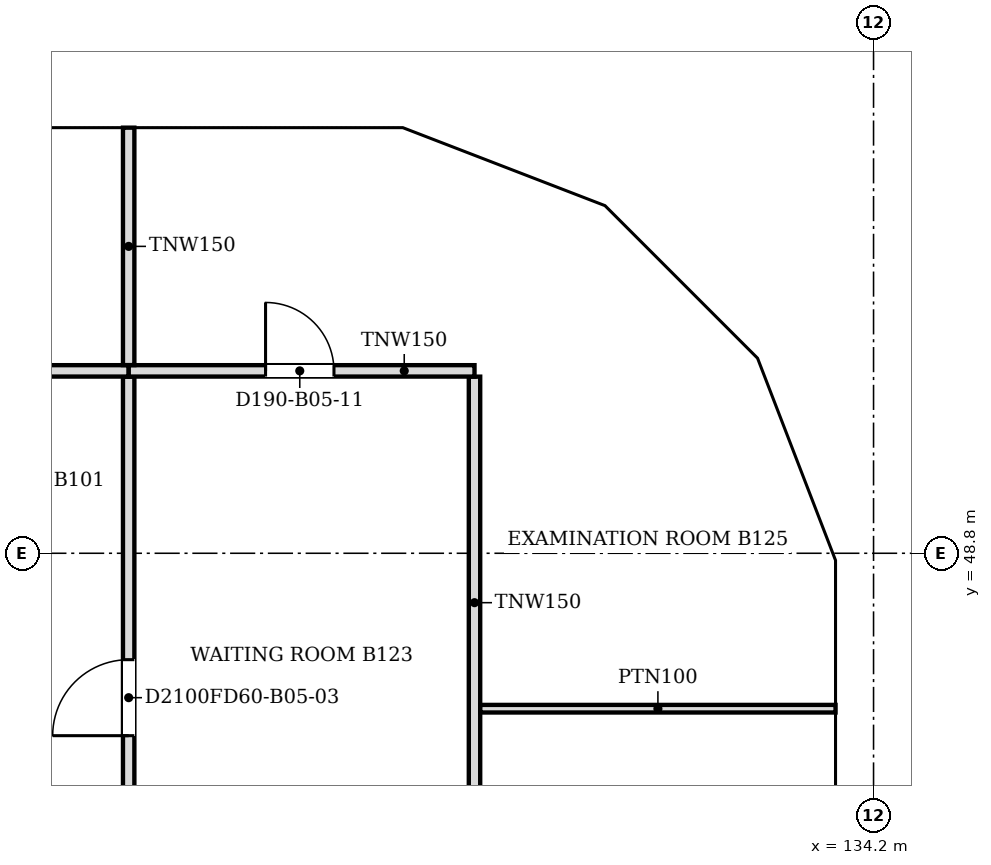
"""IFC4 building model, lengths in metres.
Left out: names, types, materials, properties, quantities, classifications, styles, units other than length and angle.
Written with IfcOpenShell. Run it as: python <this file> out.ifc"""

import sys

from ifc_helpers import new_model, si_unit, direction, frame, frame_2d, origin, place, context, subcontext, project, spatial, polyline, rectangle, outline, extrude, faceted_brep, source, transform, mapped, element, fill, save


model = new_model("IFC4")
c1 = context("Model", 3, precision=1e-05, world=origin(), true_north=direction((0.0, 1.0)))
c2 = subcontext(c1, "Body", "Model", "MODEL_VIEW")
j1 = project(units=[si_unit("LENGTHUNIT", "METRE"), si_unit("PLANEANGLEUNIT", "RADIAN")], contexts=[c1])
p1 = place(None, origin())
s1 = spatial("IfcSite", under=j1, at=p1, CompositionType="ELEMENT")
p2 = place(p1, origin())
s2 = spatial("IfcBuilding", under=s1, at=p2, CompositionType="ELEMENT")
p3 = place(p2, frame((0.0, 0.0, 48.6)))
s3 = spatial("IfcBuildingStorey", under=s2, at=p3, CompositionType="ELEMENT", Elevation=48.6)
m1 = source(origin(), c2, "Body", "Brep", [
    faceted_brep([(3.05, -0.25, 0.0), (6.053, -0.25, 3.8), (3.05, -0.25, 7.6), (0.0, -0.25, 3.8), (0.0, 0.25, 3.8), (3.05, 0.25, 7.6), (6.007, 0.25, 3.859), (6.007, 0.25, 3.741), (3.05, 0.25, 0.0), (6.053, 0.0, 3.8)], [[[0, 1, 2, 3]], [[4, 5, 6, 7, 8]], [[8, 7, 9, 1, 0]], [[6, 5, 2, 1, 9]], [[5, 4, 3, 2]], [[4, 8, 0, 3]], [[7, 6, 9]]]),
])
p4 = place(p3, frame((133.95, 42.7, -3.8), z_axis=(0.0, 0.0, 1.0), x_axis=(0.0, 1.0, 0.0)))
e1 = element("IfcWall", 1, at=p4, inside=s3, PredefinedType="SOLIDWALL", context=c2, shape_type="MappedRepresentation", body=[
    mapped(m1, transform((0.0, 0.0, 0.0), scale=1.0)),
])
m2 = source(origin(), c2, "Body", "SweptSolid", [
    extrude(outline(polyline([(3.049, 0.401), (5.735, 3.8), (3.049, 7.199), (0.321, 3.8), (3.049, 0.401)])), frame((0.0, 0.26, 0.0), z_axis=(0.0, -1.0, 0.0), x_axis=(1.0, 0.0, 0.0)), (0.0, 0.0, 1.0), 0.52),
])
p5 = place(p4, origin())
e2 = element("IfcOpeningElement", 2, at=p5, cuts=e1, PredefinedType="OPENING", context=c2, shape_type="MappedRepresentation", body=[
    mapped(m2, transform((0.0, 0.0, 0.0), scale=1.0)),
])
m3 = source(origin(), c2, "Body", "Brep", [
    faceted_brep([(2.95, -0.25, 0.0), (3.003, -0.25, 0.068), (3.003, -0.25, 7.531), (2.95, -0.25, 7.6), (0.0, -0.25, 3.8), (0.047, 0.25, 3.86), (2.898, 0.25, 7.532), (2.898, 0.25, 0.068), (0.047, 0.25, 3.74), (2.95, 0.0, 0.0), (2.95, 0.0, 7.6), (0.0, 0.0, 3.8)], [[[0, 1, 2, 3, 4]], [[5, 6, 7, 8]], [[1, 0, 9]], [[10, 3, 2]], [[6, 5, 11, 4, 3, 10]], [[8, 7, 9, 0, 4, 11]], [[8, 11, 5]], [[1, 9, 7, 6, 10, 2]]]),
])
p6 = place(p3, frame((133.95, 48.753, -3.8), z_axis=(0.0, 0.0, 1.0), x_axis=(-0.359855894603, 0.933007896601, 0.0)))
e3 = element("IfcWall", 3, at=p6, inside=s3, PredefinedType="SOLIDWALL", context=c2, shape_type="MappedRepresentation", body=[
    mapped(m3, transform((0.0, 0.0, 0.0), scale=1.0)),
])
m4 = source(origin(), c2, "Body", "SweptSolid", [
    extrude(outline(polyline([(2.75, 6.935), (0.316, 3.8), (2.75, 0.665), (2.75, 6.935)])), frame((0.0, 0.26, 0.0), z_axis=(0.0, -1.0, 0.0), x_axis=(1.0, 0.0, 0.0)), (0.0, 0.0, 1.0), 0.52),
])
p7 = place(p6, origin())
e4 = element("IfcOpeningElement", 4, at=p7, cuts=e3, PredefinedType="OPENING", context=c2, shape_type="MappedRepresentation", body=[
    mapped(m4, transform((0.0, 0.0, 0.0), scale=1.0)),
])
m5 = source(origin(), c2, "Body", "Brep", [
    faceted_brep([(0.053, -0.25, 0.0), (2.997, -0.25, 3.8), (0.053, -0.25, 7.6), (0.0, -0.25, 7.532), (0.0, -0.25, 0.068), (0.106, 0.25, 7.531), (2.944, 0.25, 3.868), (2.944, 0.25, 3.732), (0.106, 0.25, 0.068), (2.997, 0.0, 3.8), (0.053, 0.0, 0.0), (0.053, 0.0, 7.6)], [[[0, 1, 2, 3, 4]], [[5, 6, 7, 8]], [[8, 7, 9, 1, 0, 10]], [[6, 5, 11, 2, 1, 9]], [[3, 2, 11]], [[10, 0, 4]], [[8, 10, 4, 3, 11, 5]], [[7, 6, 9]]]),
])
p8 = place(p3, frame((132.926, 51.469, -3.8), z_axis=(0.0, 0.0, 1.0), x_axis=(-0.707066050402, 0.707147509625, 0.0)))
e5 = element("IfcWall", 5, at=p8, inside=s3, PredefinedType="SOLIDWALL", context=c2, shape_type="MappedRepresentation", body=[
    mapped(m5, transform((0.0, 0.0, 0.0), scale=1.0)),
])
m6 = source(origin(), c2, "Body", "SweptSolid", [
    extrude(outline(polyline([(0.253, 0.666), (2.681, 3.8), (0.253, 6.934), (0.253, 0.666)])), frame((0.0, 0.26, 0.0), z_axis=(0.0, -1.0, 0.0), x_axis=(1.0, 0.0, 0.0)), (0.0, 0.0, 1.0), 0.52),
])
p9 = place(p8, origin())
e6 = element("IfcOpeningElement", 6, at=p9, cuts=e5, PredefinedType="OPENING", context=c2, shape_type="MappedRepresentation", body=[
    mapped(m6, transform((0.0, 0.0, 0.0), scale=1.0)),
])
m7 = source(origin(), c2, "Body", "Brep", [
    faceted_brep([(2.95, -0.25, 0.0), (2.997, -0.25, 0.059), (2.997, -0.25, 7.541), (2.95, -0.25, 7.6), (0.0, -0.25, 3.8), (0.053, 0.25, 3.868), (2.904, 0.25, 7.54), (2.904, 0.25, 0.06), (0.053, 0.25, 3.732), (2.95, 0.0, 0.0), (2.95, 0.0, 7.6), (0.0, 0.0, 3.8)], [[[0, 1, 2, 3, 4]], [[5, 6, 7, 8]], [[1, 0, 9]], [[10, 3, 2]], [[6, 5, 11, 4, 3, 10]], [[8, 7, 9, 0, 4, 11]], [[8, 11, 5]], [[1, 9, 7, 6, 10, 2]]]),
])
p10 = place(p3, frame((130.806, 53.588, -3.8), z_axis=(0.0, 0.0, 1.0), x_axis=(-0.932990326376, 0.359901446078, 0.0)))
e7 = element("IfcWall", 7, at=p10, inside=s3, PredefinedType="SOLIDWALL", context=c2, shape_type="MappedRepresentation", body=[
    mapped(m7, transform((0.0, 0.0, 0.0), scale=1.0)),
])
p11 = place(p10, origin())
e8 = element("IfcOpeningElement", 8, at=p11, cuts=e7, PredefinedType="OPENING", context=c2, shape_type="MappedRepresentation", body=[
    mapped(m4, transform((0.0, 0.0, 0.0), scale=1.0)),
])
m8 = source(origin(), c2, "Body", "Brep", [
    faceted_brep([(0.047, -0.25, 0.0), (3.05, -0.25, 3.8), (0.047, -0.25, 7.6), (0.0, -0.25, 7.54), (0.0, -0.25, 0.06), (0.093, 0.25, 7.541), (3.05, 0.25, 3.8), (0.093, 0.25, 0.059), (0.047, 0.0, 0.0), (0.047, 0.0, 7.6)], [[[0, 1, 2, 3, 4]], [[5, 6, 7]], [[7, 6, 1, 0, 8]], [[6, 5, 9, 2, 1]], [[3, 2, 9]], [[8, 0, 4]], [[7, 8, 4, 3, 9, 5]]]),
])
p12 = place(p3, frame((128.1, 54.65, -3.8), z_axis=(0.0, 0.0, 1.0), x_axis=(-1.0, 0.0, 0.0)))
e9 = element("IfcWall", 9, at=p12, inside=s3, PredefinedType="SOLIDWALL", context=c2, shape_type="MappedRepresentation", body=[
    mapped(m8, transform((0.0, 0.0, 0.0), scale=1.0)),
])
m9 = source(origin(), c2, "Body", "SweptSolid", [
    extrude(outline(polyline([(0.247, 0.656), (2.731, 3.8), (0.247, 6.944), (0.247, 0.656)])), frame((0.0, 0.26, 0.0), z_axis=(0.0, -1.0, 0.0), x_axis=(1.0, 0.0, 0.0)), (0.0, 0.0, 1.0), 0.52),
])
p13 = place(p12, origin())
e10 = element("IfcOpeningElement", 10, at=p13, cuts=e9, PredefinedType="OPENING", context=c2, shape_type="MappedRepresentation", body=[
    mapped(m9, transform((0.0, 0.0, 0.0), scale=1.0)),
])
m10 = source(origin(), c2, "Body", "SweptSolid", [
    extrude(outline(polyline([(3.05, 0.0), (6.1, 3.8), (3.05, 7.6), (0.0, 3.8), (3.05, 0.0)])), frame((0.0, 0.25, 0.0), z_axis=(0.0, -1.0, 0.0), x_axis=(1.0, 0.0, 0.0)), (0.0, 0.0, 1.0), 0.5),
])
p14 = place(p3, frame((125.05, 54.65, -3.8), z_axis=(0.0, 0.0, 1.0), x_axis=(-1.0, 0.0, 0.0)))
e11 = element("IfcWall", 11, at=p14, inside=s3, PredefinedType="SOLIDWALL", context=c2, shape_type="MappedRepresentation", body=[
    mapped(m10, transform((0.0, 0.0, 0.0), scale=1.0)),
])
m11 = source(origin(), c2, "Body", "SweptSolid", [
    extrude(outline(polyline([(3.05, 0.399), (5.78, 3.8), (3.05, 7.2), (0.321, 3.8), (3.05, 0.399)])), frame((0.0, 0.26, 0.0), z_axis=(0.0, -1.0, 0.0), x_axis=(1.0, 0.0, 0.0)), (0.0, 0.0, 1.0), 0.52),
])
p15 = place(p14, origin())
e12 = element("IfcOpeningElement", 12, at=p15, cuts=e11, PredefinedType="OPENING", context=c2, shape_type="MappedRepresentation", body=[
    mapped(m11, transform((0.0, 0.0, 0.0), scale=1.0)),
])
p16 = place(p2, frame((0.0, 0.0, 52.4)))
s4 = spatial("IfcBuildingStorey", under=s2, at=p16, CompositionType="ELEMENT", Elevation=52.4)
m12 = source(origin(), c2, "Body", "Brep", [
    faceted_brep([(3.003, -0.25, 0.0), (3.05, -0.25, 0.06), (3.05, -0.25, 7.54), (3.003, -0.25, 7.6), (0.0, -0.25, 3.8), (0.0, 0.25, 3.8), (2.957, 0.25, 7.541), (2.957, 0.25, 0.059), (3.003, 0.0, 0.0), (3.003, 0.0, 7.6)], [[[0, 1, 2, 3, 4]], [[5, 6, 7]], [[1, 0, 8]], [[9, 3, 2]], [[6, 5, 4, 3, 9]], [[5, 7, 8, 0, 4]], [[1, 8, 7, 6, 9, 2]]]),
])
p17 = place(p16, frame((133.95, 45.75, -3.8), z_axis=(0.0, 0.0, 1.0), x_axis=(0.0, 1.0, 0.0)))
e13 = element("IfcWall", 13, at=p17, inside=s4, PredefinedType="SOLIDWALL", context=c2, shape_type="MappedRepresentation", body=[
    mapped(m12, transform((0.0, 0.0, 0.0), scale=1.0)),
])
m13 = source(origin(), c2, "Body", "SweptSolid", [
    extrude(outline(polyline([(2.803, 6.944), (0.319, 3.8), (2.803, 0.656), (2.803, 6.944)])), frame((0.0, 0.26, 0.0), z_axis=(0.0, -1.0, 0.0), x_axis=(1.0, 0.0, 0.0)), (0.0, 0.0, 1.0), 0.52),
])
p18 = place(p17, origin())
e14 = element("IfcOpeningElement", 14, at=p18, cuts=e13, PredefinedType="OPENING", context=c2, shape_type="MappedRepresentation", body=[
    mapped(m13, transform((0.0, 0.0, 0.0), scale=1.0)),
])
m14 = source(origin(), c2, "Body", "Brep", [
    faceted_brep([(0.047, -0.25, 0.0), (2.997, -0.25, 3.8), (0.047, -0.25, 7.6), (0.0, -0.25, 7.541), (0.0, -0.25, 0.059), (0.093, 0.25, 7.54), (2.944, 0.25, 3.868), (2.944, 0.25, 3.732), (0.093, 0.25, 0.06), (2.997, 0.0, 3.8), (0.047, 0.0, 0.0), (0.047, 0.0, 7.6)], [[[0, 1, 2, 3, 4]], [[5, 6, 7, 8]], [[8, 7, 9, 1, 0, 10]], [[6, 5, 11, 2, 1, 9]], [[3, 2, 11]], [[10, 0, 4]], [[8, 10, 4, 3, 11, 5]], [[9, 7, 6]]]),
])
p19 = place(p16, frame((133.967, 48.71, -3.8), z_axis=(0.0, 0.0, 1.0), x_axis=(-0.359901446078, 0.932990326376, 0.0)))
e15 = element("IfcWall", 15, at=p19, inside=s4, PredefinedType="SOLIDWALL", context=c2, shape_type="MappedRepresentation", body=[
    mapped(m14, transform((0.0, 0.0, 0.0), scale=1.0)),
])
m15 = source(origin(), c2, "Body", "SweptSolid", [
    extrude(outline(polyline([(0.247, 0.665), (2.681, 3.8), (0.247, 6.935), (0.247, 0.665)])), frame((0.0, 0.26, 0.0), z_axis=(0.0, -1.0, 0.0), x_axis=(1.0, 0.0, 0.0)), (0.0, 0.0, 1.0), 0.52),
])
p20 = place(p19, origin())
e16 = element("IfcOpeningElement", 16, at=p20, cuts=e15, PredefinedType="OPENING", context=c2, shape_type="MappedRepresentation", body=[
    mapped(m15, transform((0.0, 0.0, 0.0), scale=1.0)),
])
m16 = source(origin(), c2, "Body", "Brep", [
    faceted_brep([(2.944, -0.25, 0.0), (2.997, -0.25, 0.068), (2.997, -0.25, 7.532), (2.944, -0.25, 7.6), (0.0, -0.25, 3.8), (0.053, 0.25, 3.868), (2.891, 0.25, 7.532), (2.891, 0.25, 0.068), (0.053, 0.25, 3.731), (2.944, 0.0, 0.0), (2.944, 0.0, 7.6), (0.0, 0.0, 3.8)], [[[0, 1, 2, 3, 4]], [[5, 6, 7, 8]], [[1, 0, 9]], [[10, 3, 2]], [[6, 5, 11, 4, 3, 10]], [[8, 7, 9, 0, 4, 11]], [[8, 11, 5]], [[1, 9, 7, 6, 10, 2]]]),
])
p21 = place(p16, frame((132.888, 51.506, -3.8), z_axis=(0.0, 0.0, 1.0), x_axis=(-0.707147509625, 0.707066050402, 0.0)))
e17 = element("IfcWall", 17, at=p21, inside=s4, PredefinedType="SOLIDWALL", context=c2, shape_type="MappedRepresentation", body=[
    mapped(m16, transform((0.0, 0.0, 0.0), scale=1.0)),
])
m17 = source(origin(), c2, "Body", "SweptSolid", [
    extrude(outline(polyline([(2.744, 6.934), (0.316, 3.8), (2.744, 0.666), (2.744, 6.934)])), frame((0.0, 0.26, 0.0), z_axis=(0.0, -1.0, 0.0), x_axis=(1.0, 0.0, 0.0)), (0.0, 0.0, 1.0), 0.52),
])
p22 = place(p21, origin())
e18 = element("IfcOpeningElement", 18, at=p22, cuts=e17, PredefinedType="OPENING", context=c2, shape_type="MappedRepresentation", body=[
    mapped(m17, transform((0.0, 0.0, 0.0), scale=1.0)),
])
m18 = source(origin(), c2, "Body", "Brep", [
    faceted_brep([(0.053, -0.25, 0.0), (3.003, -0.25, 3.8), (0.053, -0.25, 7.6), (0.0, -0.25, 7.531), (0.0, -0.25, 0.068), (0.106, 0.25, 7.532), (2.957, 0.25, 3.86), (2.957, 0.25, 3.74), (0.106, 0.25, 0.068), (3.003, 0.0, 3.8), (0.053, 0.0, 0.0), (0.053, 0.0, 7.6)], [[[0, 1, 2, 3, 4]], [[5, 6, 7, 8]], [[8, 7, 9, 1, 0, 10]], [[6, 5, 11, 2, 1, 9]], [[3, 2, 11]], [[10, 0, 4]], [[8, 10, 4, 3, 11, 5]], [[9, 7, 6]]]),
])
p23 = place(p16, frame((130.856, 53.569, -3.8), z_axis=(0.0, 0.0, 1.0), x_axis=(-0.933007896601, 0.359855894603, 0.0)))
e19 = element("IfcWall", 19, at=p23, inside=s4, PredefinedType="SOLIDWALL", context=c2, shape_type="MappedRepresentation", body=[
    mapped(m18, transform((0.0, 0.0, 0.0), scale=1.0)),
])
m19 = source(origin(), c2, "Body", "SweptSolid", [
    extrude(outline(polyline([(0.253, 0.665), (2.687, 3.8), (0.253, 6.935), (0.253, 0.665)])), frame((0.0, 0.26, 0.0), z_axis=(0.0, -1.0, 0.0), x_axis=(1.0, 0.0, 0.0)), (0.0, 0.0, 1.0), 0.52),
])
p24 = place(p23, origin())
e20 = element("IfcOpeningElement", 20, at=p24, cuts=e19, PredefinedType="OPENING", context=c2, shape_type="MappedRepresentation", body=[
    mapped(m19, transform((0.0, 0.0, 0.0), scale=1.0)),
])
m20 = source(origin(), c2, "Body", "Brep", [
    faceted_brep([(3.003, -0.25, 0.0), (6.053, -0.25, 3.8), (3.003, -0.25, 7.6), (0.0, -0.25, 3.8), (0.047, 0.25, 3.859), (3.003, 0.25, 7.6), (6.053, 0.25, 3.8), (3.003, 0.25, 0.0), (0.047, 0.25, 3.741), (0.0, 0.0, 3.8)], [[[0, 1, 2, 3]], [[4, 5, 6, 7, 8]], [[7, 6, 1, 0]], [[6, 5, 2, 1]], [[5, 4, 9, 3, 2]], [[8, 7, 0, 3, 9]], [[8, 9, 4]]]),
])
p25 = place(p16, frame((128.053, 54.65, -3.8), z_axis=(0.0, 0.0, 1.0), x_axis=(-1.0, 0.0, 0.0)))
e21 = element("IfcWall", 21, at=p25, inside=s4, PredefinedType="SOLIDWALL", context=c2, shape_type="MappedRepresentation", body=[
    mapped(m20, transform((0.0, 0.0, 0.0), scale=1.0)),
])
m21 = source(origin(), c2, "Body", "SweptSolid", [
    extrude(outline(polyline([(3.005, 0.401), (5.733, 3.8), (3.005, 7.199), (0.319, 3.8), (3.005, 0.401)])), frame((0.0, 0.26, 0.0), z_axis=(0.0, -1.0, 0.0), x_axis=(1.0, 0.0, 0.0)), (0.0, 0.0, 1.0), 0.52),
])
p26 = place(p25, origin())
e22 = element("IfcOpeningElement", 22, at=p26, cuts=e21, PredefinedType="OPENING", context=c2, shape_type="MappedRepresentation", body=[
    mapped(m21, transform((0.0, 0.0, 0.0), scale=1.0)),
])
p27 = place(p3, frame((124.4, 51.124, 0.0), z_axis=(0.0, 0.0, 1.0), x_axis=(0.0, -1.0, 0.0)))
e23 = element("IfcWall", 23, at=p27, inside=s3, PredefinedType="PARTITIONING", context=c2, shape_type="SweptSolid", body=[
    extrude(rectangle(XDim=14.524, YDim=0.15, at=frame_2d((7.262, 0.0))), origin(), (0.0, 0.0, 1.0), 3.067),
])
m22 = source(origin(), c2, "Body", "SweptSolid", [
    extrude(rectangle(XDim=1.0, YDim=2.1, at=frame_2d((0.5, 1.05))), frame((0.0, 0.085, 0.0), z_axis=(0.0, -1.0, 0.0), x_axis=(1.0, 0.0, 0.0)), (0.0, 0.0, 1.0), 0.17),
])
p28 = place(p27, frame((3.724, 0.0, 0.0)))
e24 = element("IfcOpeningElement", 24, at=p28, cuts=e23, PredefinedType="OPENING", context=c2, shape_type="MappedRepresentation", body=[
    mapped(m22, transform((0.0, 0.0, 0.0), scale=1.0)),
])
p29 = place(p3, frame((128.95, 51.124, 0.0), z_axis=(0.0, 0.0, 1.0), x_axis=(0.0, -1.0, 0.0)))
e25 = element("IfcWall", 25, at=p29, inside=s3, PredefinedType="PARTITIONING", context=c2, shape_type="SweptSolid", body=[
    extrude(rectangle(XDim=8.448, YDim=0.15, at=frame_2d((4.224, 0.0))), origin(), (0.0, 0.0, 1.0), 3.067),
])
m23 = source(origin(), c2, "Body", "SweptSolid", [
    extrude(rectangle(XDim=0.9, YDim=2.1, at=frame_2d((0.45, 1.05))), frame((0.0, 0.085, 0.0), z_axis=(0.0, -1.0, 0.0), x_axis=(1.0, 0.0, 0.0)), (0.0, 0.0, 1.0), 0.17),
])
p30 = place(p29, frame((5.948, 0.0, 0.0)))
e26 = element("IfcOpeningElement", 26, at=p30, cuts=e25, PredefinedType="OPENING", context=c2, shape_type="MappedRepresentation", body=[
    mapped(m23, transform((0.0, 0.0, 0.0), scale=1.0)),
])
p31 = place(p3, frame((129.026, 46.755, 0.0), z_axis=(0.0, 0.0, 1.0), x_axis=(1.0, 0.0, 0.0)))
e27 = element("IfcWall", 27, at=p31, inside=s3, PredefinedType="PARTITIONING", context=c2, shape_type="SweptSolid", body=[
    extrude(rectangle(XDim=4.674, YDim=0.1, at=frame_2d((2.337, 0.0))), origin(), (0.0, 0.0, 1.0), 3.067),
])
p32 = place(p3, frame((108.5, 51.2, 0.0), z_axis=(0.0, 0.0, 1.0), x_axis=(1.0, 0.0, 0.0)))
e28 = element("IfcWall", 28, at=p32, inside=s3, PredefinedType="PARTITIONING", context=c2, shape_type="SweptSolid", body=[
    extrude(rectangle(XDim=15.9, YDim=0.15, at=frame_2d((7.95, 0.0))), origin(), (0.0, 0.0, 1.0), 3.067),
])
p33 = place(p32, frame((7.4, 0.0, 0.0)))
e29 = element("IfcOpeningElement", 29, at=p33, cuts=e28, PredefinedType="OPENING", context=c2, shape_type="MappedRepresentation", body=[
    mapped(m22, transform((0.0, 0.0, 0.0), scale=1.0)),
])
p34 = place(p3, frame((124.401, 51.2, 0.0), z_axis=(0.0, 0.0, 1.0), x_axis=(1.0, 0.0, 0.0)))
e30 = element("IfcWall", 30, at=p34, inside=s3, PredefinedType="PARTITIONING", context=c2, shape_type="SweptSolid", body=[
    extrude(rectangle(XDim=4.549, YDim=0.15, at=frame_2d((2.274, 0.0))), origin(), (0.0, 0.0, 1.0), 3.067),
])
p35 = place(p34, frame((1.8, 0.0, 0.0)))
e31 = element("IfcOpeningElement", 31, at=p35, cuts=e30, PredefinedType="OPENING", context=c2, shape_type="MappedRepresentation", body=[
    mapped(m23, transform((0.0, 0.0, 0.0), scale=1.0)),
])
p36 = place(p3, frame((124.4, 51.276, 0.0), z_axis=(0.0, 0.0, 1.0), x_axis=(0.0, 1.0, 0.0)))
e32 = element("IfcWall", 32, at=p36, inside=s3, PredefinedType="PARTITIONING", context=c2, shape_type="SweptSolid", body=[
    extrude(rectangle(XDim=3.124, YDim=0.15, at=frame_2d((1.562, 0.0))), origin(), (0.0, 0.0, 1.0), 3.067),
])
m24 = source(origin(), c2, "Body", "SweptSolid", [
    extrude(rectangle(XDim=1.0, YDim=2.1, at=frame_2d((0.5, 1.05))), frame((0.0, 0.025, 0.0), z_axis=(0.0, -1.0, 0.0), x_axis=(1.0, 0.0, 0.0)), (0.0, 0.0, 1.0), 0.05),
])
p37 = place(p28, origin())
e33 = element("IfcDoor", 33, at=p37, inside=s3, OperationType="SINGLE_SWING_RIGHT", PredefinedType="DOOR", context=c2, shape_type="MappedRepresentation", body=[
    mapped(m24, transform((0.0, 0.0, 0.0), scale=1.0)),
])
fill(e24, e33)
m25 = source(origin(), c2, "Body", "SweptSolid", [
    extrude(rectangle(XDim=0.9, YDim=2.1, at=frame_2d((0.45, 1.05))), frame((0.0, 0.025, 0.0), z_axis=(0.0, -1.0, 0.0), x_axis=(1.0, 0.0, 0.0)), (0.0, 0.0, 1.0), 0.05),
])
p38 = place(p35, origin())
e34 = element("IfcDoor", 34, at=p38, inside=s3, OperationType="SINGLE_SWING_LEFT", PredefinedType="DOOR", context=c2, shape_type="MappedRepresentation", body=[
    mapped(m25, transform((0.0, 0.0, 0.0), scale=1.0)),
])
fill(e31, e34)
save(model, sys.argv[1])
